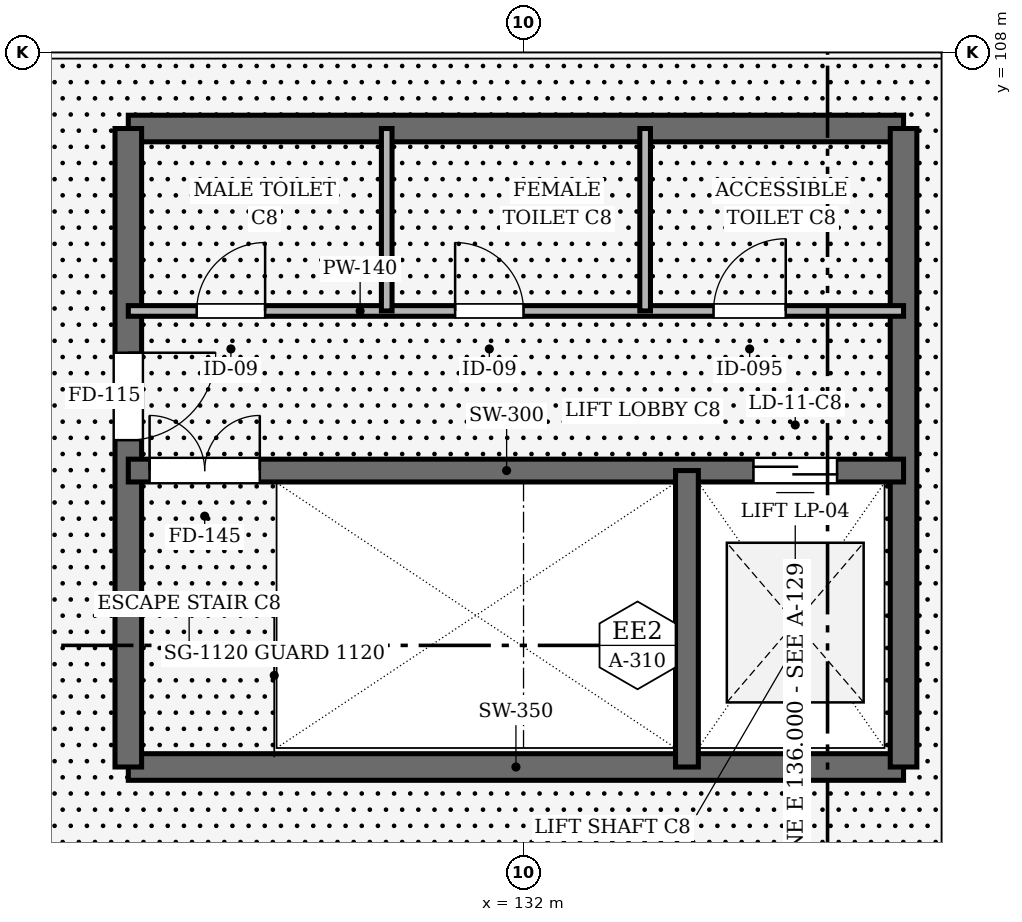
"""IFC4 building model, lengths in metres.
Left out: names, types, materials, properties, quantities, classifications, styles, units other than length and angle.
Written with IfcOpenShell. Run it as: python <this file> out.ifc"""

import sys

from ifc_helpers import new_model, si_unit, direction, frame, frame_2d, origin, place, context, subcontext, project, spatial, rectangle, extrude, element, fill, save


model = new_model("IFC4")
c1 = context("Model", 3, precision=1e-05, world=origin(), true_north=direction((0.0, 1.0)))
c2 = subcontext(c1, "Body", "Model", "MODEL_VIEW")
j1 = project(units=[si_unit("LENGTHUNIT", "METRE"), si_unit("PLANEANGLEUNIT", "RADIAN")], contexts=[c1])
p1 = place(None, origin())
s1 = spatial("IfcSite", under=j1, at=p1, CompositionType="ELEMENT")
p2 = place(p1, origin())
s2 = spatial("IfcBuilding", under=s1, at=p2, CompositionType="ELEMENT")
p3 = place(p2, frame((0.0, 0.0, 10.8)))
s3 = spatial("IfcBuildingStorey", under=s2, at=p3, CompositionType="ELEMENT", Elevation=10.8)
for number, where, z_axis, x_axis in (
    (1, (126.8, 98.6, 0.0), (0.0, 0.0, 1.0), (1.0, 0.0, 0.0)),
    (2, (137.0, 107.0, 0.0), (0.0, 0.0, 1.0), (-1.0, 0.0, 0.0)),
):
    element("IfcWall", number, at=place(p3, frame(where, z_axis=z_axis, x_axis=x_axis)), inside=s3, PredefinedType="SHEAR", context=c2, shape_type="SweptSolid", body=[
        extrude(rectangle(XDim=10.2, YDim=0.35, at=frame_2d((5.1, 0.0))), origin(), (0.0, 0.0, 1.0), 5.4),
    ])
p4 = place(p3, frame((126.8, 107.0, 0.0), z_axis=(0.0, 0.0, 1.0), x_axis=(0.0, -1.0, 0.0)))
e3 = element("IfcWall", 3, at=p4, inside=s3, PredefinedType="SHEAR", context=c2, shape_type="SweptSolid", body=[
    extrude(rectangle(XDim=8.4, YDim=0.35, at=frame_2d((4.2, 0.0))), origin(), (0.0, 0.0, 1.0), 5.4),
])
p5 = place(p4, frame((2.95, 0.0, 0.0)))
e4 = element("IfcOpeningElement", 4, at=p5, cuts=e3, PredefinedType="OPENING", context=c2, shape_type="SweptSolid", body=[
    extrude(rectangle(XDim=1.15, YDim=2.15, at=frame_2d((0.575, 1.075))), frame((0.0, 0.185, 0.0), z_axis=(0.0, -1.0, 0.0), x_axis=(1.0, 0.0, 0.0)), (0.0, 0.0, 1.0), 0.37),
])
p6 = place(p3, frame((137.0, 98.6, 0.0), z_axis=(0.0, 0.0, 1.0), x_axis=(0.0, 1.0, 0.0)))
e5 = element("IfcWall", 5, at=p6, inside=s3, PredefinedType="SHEAR", context=c2, shape_type="SweptSolid", body=[
    extrude(rectangle(XDim=8.4, YDim=0.35, at=frame_2d((4.2, 0.0))), origin(), (0.0, 0.0, 1.0), 5.4),
])
p7 = place(p3, frame((126.8, 102.5, 0.0), z_axis=(0.0, 0.0, 1.0), x_axis=(1.0, 0.0, 0.0)))
e6 = element("IfcWall", 6, at=p7, inside=s3, PredefinedType="SHEAR", context=c2, shape_type="SweptSolid", body=[
    extrude(rectangle(XDim=10.2, YDim=0.3, at=frame_2d((5.1, 0.0))), origin(), (0.0, 0.0, 1.0), 5.4),
])
p8 = place(p7, frame((0.28, 0.0, 0.0)))
e7 = element("IfcOpeningElement", 7, at=p8, cuts=e6, PredefinedType="OPENING", context=c2, shape_type="SweptSolid", body=[
    extrude(rectangle(XDim=1.45, YDim=2.15, at=frame_2d((0.725, 1.075))), frame((0.0, 0.16, 0.0), z_axis=(0.0, -1.0, 0.0), x_axis=(1.0, 0.0, 0.0)), (0.0, 0.0, 1.0), 0.32),
])
p9 = place(p7, frame((8.225, 0.0, 0.0)))
e8 = element("IfcOpeningElement", 8, at=p9, cuts=e6, PredefinedType="OPENING", context=c2, shape_type="SweptSolid", body=[
    extrude(rectangle(XDim=1.1, YDim=2.15, at=frame_2d((0.55, 1.075))), frame((0.0, 0.16, 0.0), z_axis=(0.0, -1.0, 0.0), x_axis=(1.0, 0.0, 0.0)), (0.0, 0.0, 1.0), 0.32),
])
p10 = place(p3, frame((134.15, 98.6, 0.0), z_axis=(0.0, 0.0, 1.0), x_axis=(0.0, 1.0, 0.0)))
e9 = element("IfcWall", 9, at=p10, inside=s3, PredefinedType="SHEAR", context=c2, shape_type="SweptSolid", body=[
    extrude(rectangle(XDim=3.9, YDim=0.3, at=frame_2d((1.95, 0.0))), origin(), (0.0, 0.0, 1.0), 5.4),
])
p11 = place(p3, frame((126.8, 104.6, 0.0), z_axis=(0.0, 0.0, 1.0), x_axis=(1.0, 0.0, 0.0)))
e10 = element("IfcWall", 10, at=p11, inside=s3, PredefinedType="PARTITIONING", context=c2, shape_type="SweptSolid", body=[
    extrude(rectangle(XDim=10.2, YDim=0.14, at=frame_2d((5.1, 0.0))), origin(), (0.0, 0.0, 1.0), 4.5),
])
p12 = place(p11, frame((0.9, 0.0, 0.0)))
e11 = element("IfcOpeningElement", 11, at=p12, cuts=e10, PredefinedType="OPENING", context=c2, shape_type="SweptSolid", body=[
    extrude(rectangle(XDim=0.9, YDim=2.1, at=frame_2d((0.45, 1.05))), frame((0.0, 0.08, 0.0), z_axis=(0.0, -1.0, 0.0), x_axis=(1.0, 0.0, 0.0)), (0.0, 0.0, 1.0), 0.16),
])
p13 = place(p11, frame((4.3, 0.0, 0.0)))
e12 = element("IfcOpeningElement", 12, at=p13, cuts=e10, PredefinedType="OPENING", context=c2, shape_type="SweptSolid", body=[
    extrude(rectangle(XDim=0.9, YDim=2.1, at=frame_2d((0.45, 1.05))), frame((0.0, 0.08, 0.0), z_axis=(0.0, -1.0, 0.0), x_axis=(1.0, 0.0, 0.0)), (0.0, 0.0, 1.0), 0.16),
])
p14 = place(p11, frame((7.7, 0.0, 0.0)))
e13 = element("IfcOpeningElement", 13, at=p14, cuts=e10, PredefinedType="OPENING", context=c2, shape_type="SweptSolid", body=[
    extrude(rectangle(XDim=0.95, YDim=2.1, at=frame_2d((0.475, 1.05))), frame((0.0, 0.08, 0.0), z_axis=(0.0, -1.0, 0.0), x_axis=(1.0, 0.0, 0.0)), (0.0, 0.0, 1.0), 0.16),
])
for number, where, z_axis, x_axis in (
    (14, (130.2, 104.6, 0.0), (0.0, 0.0, 1.0), (0.0, 1.0, 0.0)),
    (15, (133.6, 104.6, 0.0), (0.0, 0.0, 1.0), (0.0, 1.0, 0.0)),
):
    element("IfcWall", number, at=place(p3, frame(where, z_axis=z_axis, x_axis=x_axis)), inside=s3, PredefinedType="PARTITIONING", context=c2, shape_type="SweptSolid", body=[
        extrude(rectangle(XDim=2.4, YDim=0.14, at=frame_2d((1.2, 0.0))), origin(), (0.0, 0.0, 1.0), 4.5),
    ])
p15 = place(p5, origin())
e16 = element("IfcDoor", 16, at=p15, inside=s3, OperationType="SINGLE_SWING_LEFT", PredefinedType="DOOR", context=c2, shape_type="SweptSolid", body=[
    extrude(rectangle(XDim=1.15, YDim=2.15, at=frame_2d((0.575, 1.075))), frame((0.0, 0.025, 0.0), z_axis=(0.0, -1.0, 0.0), x_axis=(1.0, 0.0, 0.0)), (0.0, 0.0, 1.0), 0.05),
])
fill(e4, e16)
p16 = place(p8, origin())
e17 = element("IfcDoor", 17, at=p16, inside=s3, OperationType="DOUBLE_DOOR_SINGLE_SWING", PredefinedType="DOOR", context=c2, shape_type="SweptSolid", body=[
    extrude(rectangle(XDim=1.45, YDim=2.15, at=frame_2d((0.725, 1.075))), frame((0.0, 0.025, 0.0), z_axis=(0.0, -1.0, 0.0), x_axis=(1.0, 0.0, 0.0)), (0.0, 0.0, 1.0), 0.05),
])
fill(e7, e17)
p17 = place(p9, origin())
e18 = element("IfcDoor", 18, at=p17, inside=s3, OperationType="DOUBLE_DOOR_SLIDING", PredefinedType="DOOR", context=c2, shape_type="SweptSolid", body=[
    extrude(rectangle(XDim=1.1, YDim=2.15, at=frame_2d((0.55, 1.075))), frame((0.0, 0.025, 0.0), z_axis=(0.0, -1.0, 0.0), x_axis=(1.0, 0.0, 0.0)), (0.0, 0.0, 1.0), 0.05),
])
fill(e8, e18)
p18 = place(p12, origin())
e19 = element("IfcDoor", 19, at=p18, inside=s3, OperationType="SINGLE_SWING_RIGHT", PredefinedType="DOOR", context=c2, shape_type="SweptSolid", body=[
    extrude(rectangle(XDim=0.9, YDim=2.1, at=frame_2d((0.45, 1.05))), frame((0.0, 0.025, 0.0), z_axis=(0.0, -1.0, 0.0), x_axis=(1.0, 0.0, 0.0)), (0.0, 0.0, 1.0), 0.05),
])
fill(e11, e19)
p19 = place(p13, origin())
e20 = element("IfcDoor", 20, at=p19, inside=s3, OperationType="SINGLE_SWING_LEFT", PredefinedType="DOOR", context=c2, shape_type="SweptSolid", body=[
    extrude(rectangle(XDim=0.9, YDim=2.1, at=frame_2d((0.45, 1.05))), frame((0.0, 0.025, 0.0), z_axis=(0.0, -1.0, 0.0), x_axis=(1.0, 0.0, 0.0)), (0.0, 0.0, 1.0), 0.05),
])
fill(e12, e20)
p20 = place(p14, origin())
e21 = element("IfcDoor", 21, at=p20, inside=s3, OperationType="SINGLE_SWING_RIGHT", PredefinedType="DOOR", context=c2, shape_type="SweptSolid", body=[
    extrude(rectangle(XDim=0.95, YDim=2.1, at=frame_2d((0.475, 1.05))), frame((0.0, 0.025, 0.0), z_axis=(0.0, -1.0, 0.0), x_axis=(1.0, 0.0, 0.0)), (0.0, 0.0, 1.0), 0.05),
])
fill(e13, e21)
save(model, sys.argv[1])
